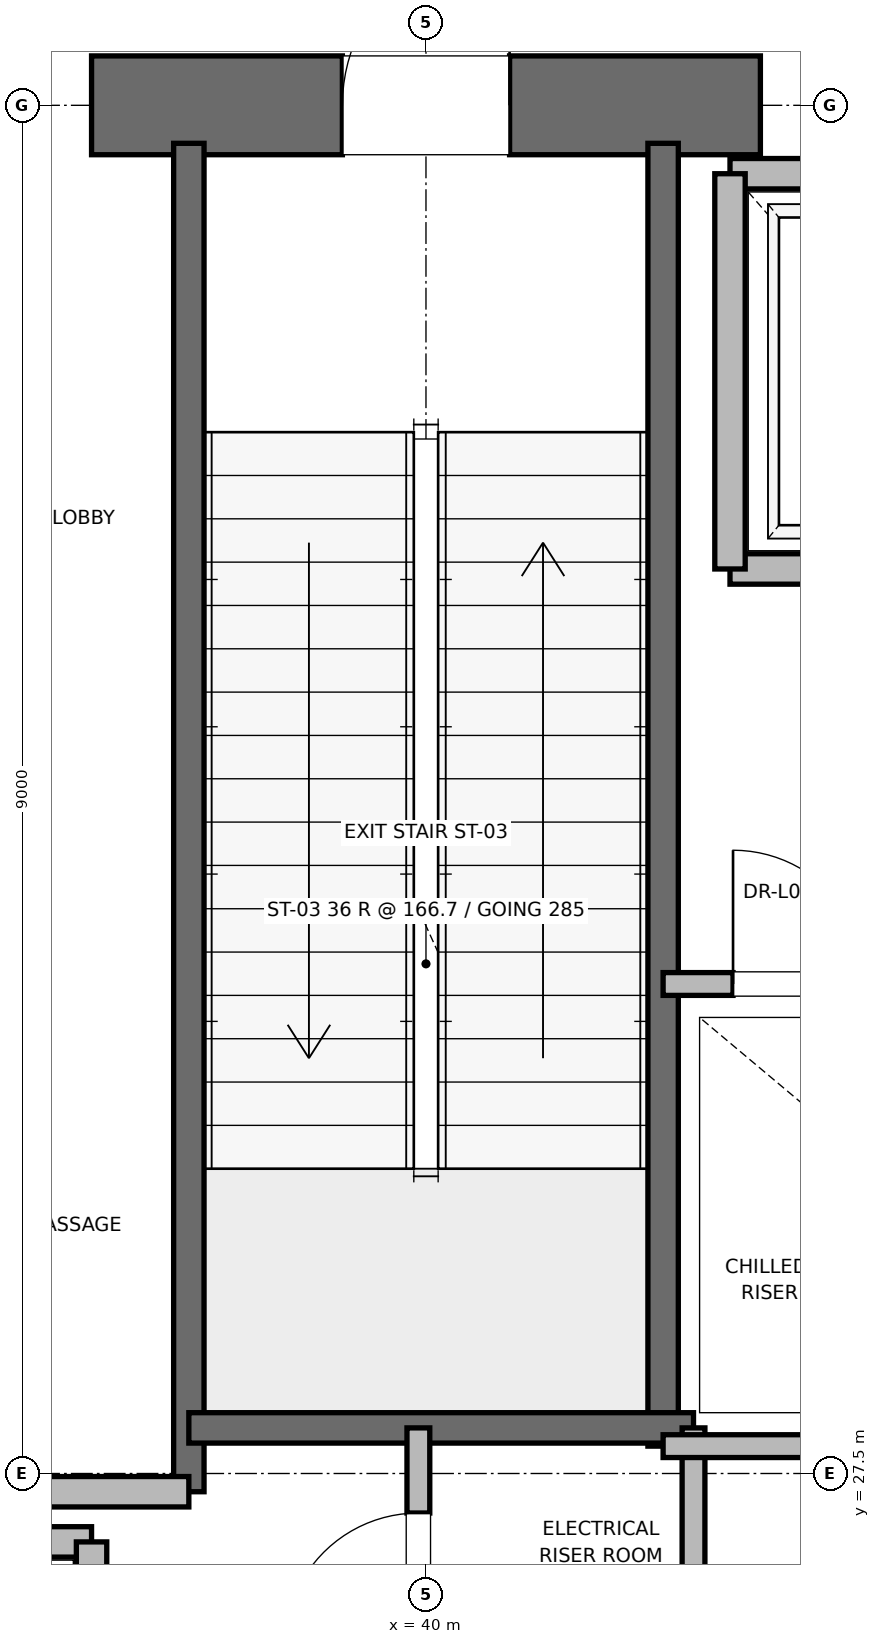
"""IFC4 building model, lengths in metres.
Left out: names, types, materials, properties, quantities, classifications, styles, units other than length and angle.
Written with IfcOpenShell. Run it as: python <this file> out.ifc"""

import sys

from ifc_helpers import new_model, si_unit, direction, frame, frame_2d, origin, place, context, subcontext, project, spatial, rectangle, extrude, element, fill, save


model = new_model("IFC4")
c1 = context("Model", 3, precision=1e-05, world=origin(), true_north=direction((0.0, 1.0)))
c2 = subcontext(c1, "Body", "Model", "MODEL_VIEW")
j1 = project(units=[si_unit("LENGTHUNIT", "METRE"), si_unit("PLANEANGLEUNIT", "RADIAN")], contexts=[c1])
p1 = place(None, origin())
s1 = spatial("IfcSite", under=j1, at=p1, CompositionType="ELEMENT")
p2 = place(p1, origin())
s2 = spatial("IfcBuilding", under=s1, at=p2, CompositionType="ELEMENT")
p3 = place(p2, frame((0.0, 0.0, 21.6)))
s3 = spatial("IfcBuildingStorey", under=s2, at=p3, CompositionType="ELEMENT", Elevation=21.6)
p4 = place(p3, frame((37.8, 36.5, 0.0), z_axis=(0.0, 0.0, 1.0), x_axis=(1.0, 0.0, 0.0)))
e1 = element("IfcWall", 1, at=p4, inside=s3, PredefinedType="SHEAR", context=c2, shape_type="SweptSolid", body=[
    extrude(rectangle(XDim=4.4, YDim=0.65, at=frame_2d((2.2, 0.0))), origin(), (0.0, 0.0, 1.0), 5.76),
])
p5 = place(p4, frame((1.65, 0.0, 0.0)))
e2 = element("IfcOpeningElement", 2, at=p5, cuts=e1, PredefinedType="OPENING", context=c2, shape_type="SweptSolid", body=[
    extrude(rectangle(XDim=1.1, YDim=2.15, at=frame_2d((0.55, 1.075))), frame((0.0, 0.325, 0.0), z_axis=(0.0, -1.0, 0.0), x_axis=(1.0, 0.0, 0.0)), (0.0, 0.0, 1.0), 0.65),
])
p6 = place(p3, frame((38.44, 27.38, 0.0), z_axis=(0.0, 0.0, 1.0), x_axis=(0.0, 1.0, 0.0)))
e3 = element("IfcWall", 3, at=p6, inside=s3, PredefinedType="SOLIDWALL", context=c2, shape_type="SweptSolid", body=[
    extrude(rectangle(XDim=8.87, YDim=0.2, at=frame_2d((4.435, 0.0))), origin(), (0.0, 0.0, 1.0), 5.76),
])
p7 = place(p3, frame((41.56, 27.68, 0.0), z_axis=(0.0, 0.0, 1.0), x_axis=(0.0, 1.0, 0.0)))
e4 = element("IfcWall", 4, at=p7, inside=s3, PredefinedType="SOLIDWALL", context=c2, shape_type="SweptSolid", body=[
    extrude(rectangle(XDim=8.57, YDim=0.2, at=frame_2d((4.285, 0.0))), origin(), (0.0, 0.0, 1.0), 5.76),
])
p8 = place(p3, frame((38.44, 27.8, 0.0), z_axis=(0.0, 0.0, 1.0), x_axis=(1.0, 0.0, 0.0)))
e5 = element("IfcWall", 5, at=p8, inside=s3, PredefinedType="SOLIDWALL", context=c2, shape_type="SweptSolid", body=[
    extrude(rectangle(XDim=3.32, YDim=0.2, at=frame_2d((1.66, 0.0))), origin(), (0.0, 0.0, 1.0), 5.76),
])
p9 = place(p3, frame((32.82, 27.38, 0.0), z_axis=(0.0, 0.0, 1.0), x_axis=(1.0, 0.0, 0.0)))
e6 = element("IfcWall", 6, at=p9, inside=s3, PredefinedType="PARTITIONING", context=c2, shape_type="SweptSolid", body=[
    extrude(rectangle(XDim=5.62, YDim=0.2, at=frame_2d((2.81, 0.0))), origin(), (0.0, 0.0, 1.0), 5.76),
])
p10 = place(p3, frame((37.8, 27.05, 0.0), z_axis=(0.0, 0.0, 1.0), x_axis=(-1.0, 0.0, 0.0)))
e7 = element("IfcWall", 7, at=p10, inside=s3, PredefinedType="SOLIDWALL", context=c2, shape_type="SweptSolid", body=[
    extrude(rectangle(XDim=2.3, YDim=0.2, at=frame_2d((1.15, 0.0))), origin(), (0.0, 0.0, 1.0), 5.76),
])
p11 = place(p3, frame((37.8, 24.45, 0.0), z_axis=(0.0, 0.0, 1.0), x_axis=(0.0, 1.0, 0.0)))
e8 = element("IfcWall", 8, at=p11, inside=s3, PredefinedType="SOLIDWALL", context=c2, shape_type="SweptSolid", body=[
    extrude(rectangle(XDim=2.6, YDim=0.2, at=frame_2d((1.3, 0.0))), origin(), (0.0, 0.0, 1.0), 5.76),
])
p12 = place(p3, frame((42.0, 33.45, 0.0), z_axis=(0.0, 0.0, 1.0), x_axis=(1.0, 0.0, 0.0)))
e9 = element("IfcWall", 9, at=p12, inside=s3, PredefinedType="SOLIDWALL", context=c2, shape_type="SweptSolid", body=[
    extrude(rectangle(XDim=2.3, YDim=0.2, at=frame_2d((1.15, 0.0))), origin(), (0.0, 0.0, 1.0), 5.76),
])
p13 = place(p12, frame((0.6, 0.0, 0.0)))
e10 = element("IfcOpeningElement", 10, at=p13, cuts=e9, PredefinedType="OPENING", context=c2, shape_type="SweptSolid", body=[
    extrude(rectangle(XDim=1.1, YDim=2.2, at=frame_2d((0.55, 1.1))), frame((0.0, 0.1, 0.0), z_axis=(0.0, -1.0, 0.0), x_axis=(1.0, 0.0, 0.0)), (0.0, 0.0, 1.0), 0.2),
])
p14 = place(p3, frame((44.3, 36.05, 0.0), z_axis=(0.0, 0.0, 1.0), x_axis=(-1.0, 0.0, 0.0)))
e11 = element("IfcWall", 11, at=p14, inside=s3, PredefinedType="SOLIDWALL", context=c2, shape_type="SweptSolid", body=[
    extrude(rectangle(XDim=2.3, YDim=0.2, at=frame_2d((1.15, 0.0))), origin(), (0.0, 0.0, 1.0), 4.54),
])
p15 = place(p3, frame((42.0, 36.05, 0.0), z_axis=(0.0, 0.0, 1.0), x_axis=(0.0, -1.0, 0.0)))
e12 = element("IfcWall", 12, at=p15, inside=s3, PredefinedType="SOLIDWALL", context=c2, shape_type="SweptSolid", body=[
    extrude(rectangle(XDim=2.6, YDim=0.2, at=frame_2d((1.3, 0.0))), origin(), (0.0, 0.0, 1.0), 4.54),
])
p16 = place(p3, frame((41.76, 23.8, 0.0), z_axis=(0.0, 0.0, 1.0), x_axis=(0.0, 1.0, 0.0)))
e13 = element("IfcWall", 13, at=p16, inside=s3, PredefinedType="PARTITIONING", context=c2, shape_type="SweptSolid", body=[
    extrude(rectangle(XDim=4.0, YDim=0.15, at=frame_2d((2.0, 0.0))), origin(), (0.0, 0.0, 1.0), 2.85),
])
p17 = place(p3, frame((39.95, 25.8, 0.0), z_axis=(0.0, 0.0, 1.0), x_axis=(0.0, 1.0, 0.0)))
e14 = element("IfcWall", 14, at=p17, inside=s3, PredefinedType="PARTITIONING", context=c2, shape_type="SweptSolid", body=[
    extrude(rectangle(XDim=2.0, YDim=0.15, at=frame_2d((1.0, 0.0))), origin(), (0.0, 0.0, 1.0), 2.85),
])
p18 = place(p17, frame((0.56, 0.0, 0.0)))
e15 = element("IfcOpeningElement", 15, at=p18, cuts=e14, PredefinedType="OPENING", context=c2, shape_type="SweptSolid", body=[
    extrude(rectangle(XDim=0.88, YDim=2.1, at=frame_2d((0.44, 1.05))), frame((0.0, 0.075, 0.0), z_axis=(0.0, -1.0, 0.0), x_axis=(1.0, 0.0, 0.0)), (0.0, 0.0, 1.0), 0.15),
])
p19 = place(p3, frame((41.56, 27.68, 0.0), z_axis=(0.0, 0.0, 1.0), x_axis=(1.0, 0.0, 0.0)))
e16 = element("IfcWall", 16, at=p19, inside=s3, PredefinedType="PARTITIONING", context=c2, shape_type="SweptSolid", body=[
    extrude(rectangle(XDim=3.59, YDim=0.15, at=frame_2d((1.795, 0.0))), origin(), (0.0, 0.0, 1.0), 2.85),
])
p20 = place(p3, frame((41.56, 30.72, 0.0), z_axis=(0.0, 0.0, 1.0), x_axis=(1.0, 0.0, 0.0)))
e17 = element("IfcWall", 17, at=p20, inside=s3, PredefinedType="PARTITIONING", context=c2, shape_type="SweptSolid", body=[
    extrude(rectangle(XDim=1.8, YDim=0.15, at=frame_2d((0.9, 0.0))), origin(), (0.0, 0.0, 1.0), 2.85),
])
p21 = place(p20, frame((0.46, 0.0, 0.0)))
e18 = element("IfcOpeningElement", 18, at=p21, cuts=e17, PredefinedType="OPENING", context=c2, shape_type="SweptSolid", body=[
    extrude(rectangle(XDim=0.88, YDim=2.1, at=frame_2d((0.44, 1.05))), frame((0.0, 0.075, 0.0), z_axis=(0.0, -1.0, 0.0), x_axis=(1.0, 0.0, 0.0)), (0.0, 0.0, 1.0), 0.15),
])
p22 = place(p5, origin())
e19 = element("IfcDoor", 19, at=p22, inside=s3, OperationType="SINGLE_SWING_RIGHT", PredefinedType="DOOR", context=c2, shape_type="SweptSolid", body=[
    extrude(rectangle(XDim=1.1, YDim=2.15, at=frame_2d((0.55, 1.075))), frame((0.0, 0.025, 0.0), z_axis=(0.0, -1.0, 0.0), x_axis=(1.0, 0.0, 0.0)), (0.0, 0.0, 1.0), 0.05),
])
fill(e2, e19)
p23 = place(p18, origin())
e20 = element("IfcDoor", 20, at=p23, inside=s3, OperationType="SINGLE_SWING_LEFT", PredefinedType="DOOR", context=c2, shape_type="SweptSolid", body=[
    extrude(rectangle(XDim=0.88, YDim=2.1, at=frame_2d((0.44, 1.05))), frame((0.0, 0.025, 0.0), z_axis=(0.0, -1.0, 0.0), x_axis=(1.0, 0.0, 0.0)), (0.0, 0.0, 1.0), 0.05),
])
fill(e15, e20)
p24 = place(p21, origin())
e21 = element("IfcDoor", 21, at=p24, inside=s3, OperationType="SINGLE_SWING_LEFT", PredefinedType="DOOR", context=c2, shape_type="SweptSolid", body=[
    extrude(rectangle(XDim=0.88, YDim=2.1, at=frame_2d((0.44, 1.05))), frame((0.0, 0.025, 0.0), z_axis=(0.0, -1.0, 0.0), x_axis=(1.0, 0.0, 0.0)), (0.0, 0.0, 1.0), 0.05),
])
fill(e18, e21)
save(model, sys.argv[1])
